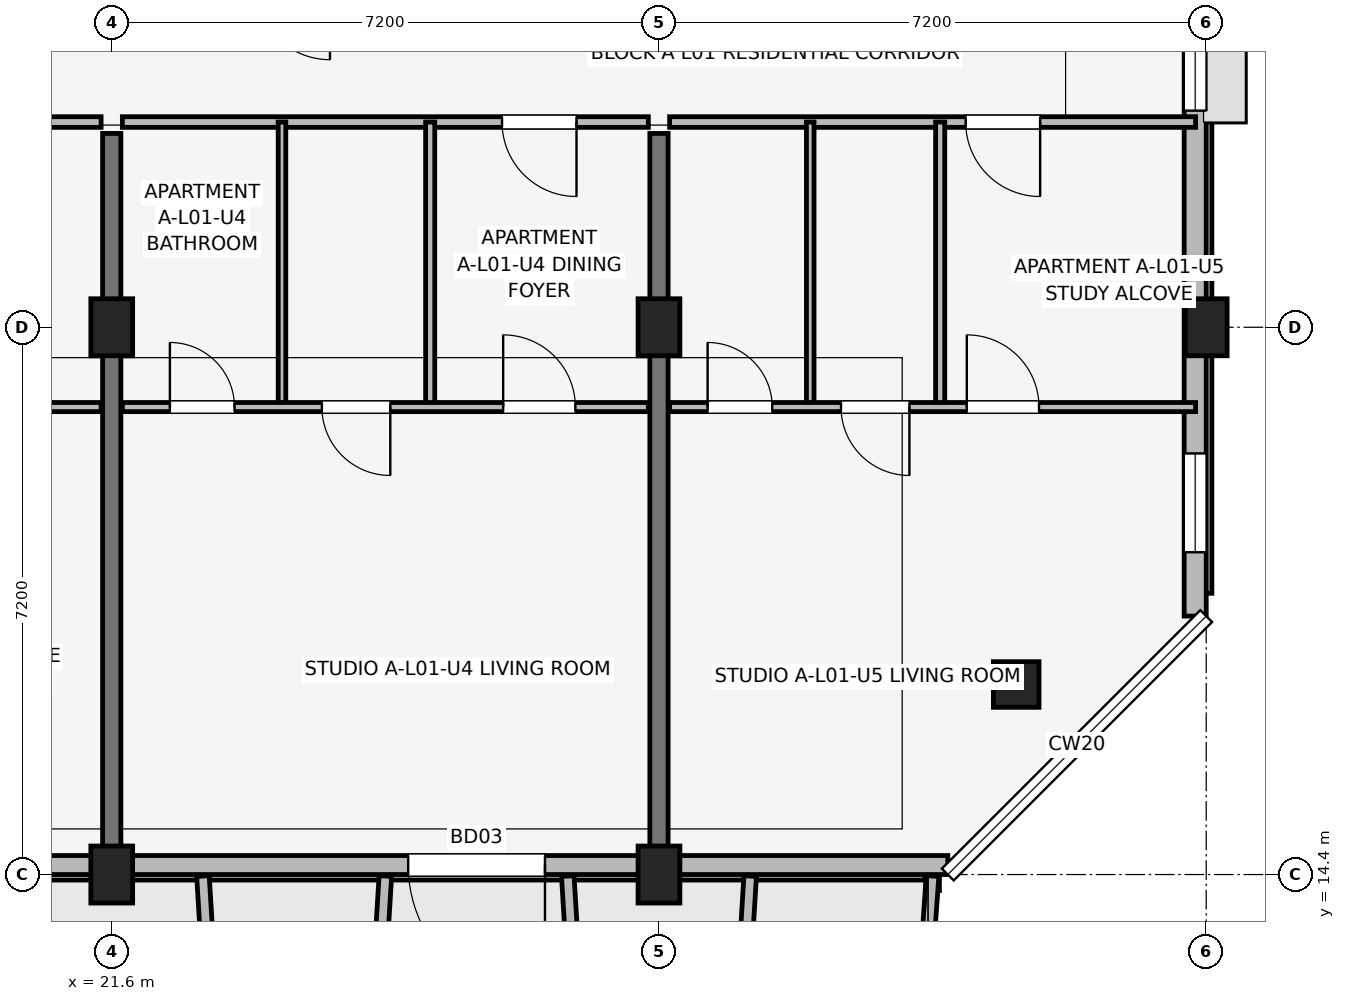
"""IFC4 building model, lengths in metres.
Left out: names, types, materials, properties, quantities, classifications, styles, units other than length and angle.
Written with IfcOpenShell. Run it as: python <this file> out.ifc"""

import sys

from ifc_helpers import new_model, si_unit, direction, frame, frame_2d, origin, origin_2d, place, context, subcontext, project, spatial, rectangle, extrude, element, fill, save


model = new_model("IFC4")
c1 = context("Model", 3, precision=1e-05, world=origin(), true_north=direction((0.0, 1.0)))
c2 = subcontext(c1, "Body", "Model", "MODEL_VIEW")
j1 = project(units=[si_unit("LENGTHUNIT", "METRE"), si_unit("PLANEANGLEUNIT", "RADIAN")], contexts=[c1])
p1 = place(None, origin())
s1 = spatial("IfcSite", under=j1, at=p1, CompositionType="ELEMENT")
p2 = place(p1, origin())
s2 = spatial("IfcBuilding", under=s1, at=p2, CompositionType="ELEMENT")
p3 = place(p2, frame((0.0, 0.0, 4.5)))
s3 = spatial("IfcBuildingStorey", under=s2, at=p3, CompositionType="ELEMENT", Elevation=4.5)
for number, where, z_axis, x_axis in (
    (1, (21.6, 14.4, 0.0), (0.0, 0.0, 1.0), (1.0, 0.0, 0.0)),
    (2, (21.6, 21.6, 0.0), (0.0, 0.0, 1.0), (1.0, 0.0, 0.0)),
    (3, (28.8, 14.4, 0.0), (0.0, 0.0, 1.0), (1.0, 0.0, 0.0)),
    (4, (28.8, 21.6, 0.0), (0.0, 0.0, 1.0), (1.0, 0.0, 0.0)),
):
    element("IfcColumn", number, at=place(p3, frame(where, z_axis=z_axis, x_axis=x_axis)), inside=s3, PredefinedType="COLUMN", context=c2, shape_type="SweptSolid", body=[
        extrude(rectangle(XDim=0.55, YDim=0.75, at=origin_2d()), origin(), (0.0, 0.0, 1.0), 4.2),
    ])
p4 = place(p3, frame((33.5, 16.9, 0.0), z_axis=(0.0, 0.0, 1.0), x_axis=(1.0, 0.0, 0.0)))
e5 = element("IfcColumn", 5, at=p4, inside=s3, PredefinedType="COLUMN", context=c2, shape_type="SweptSolid", body=[
    extrude(rectangle(XDim=0.6, YDim=0.6, at=origin_2d()), origin(), (0.0, 0.0, 1.0), 4.2),
])
p5 = place(p3, frame((36.0, 21.6, 0.0), z_axis=(0.0, 0.0, 1.0), x_axis=(1.0, 0.0, 0.0)))
e6 = element("IfcColumn", 6, at=p5, inside=s3, PredefinedType="COLUMN", context=c2, shape_type="SweptSolid", body=[
    extrude(rectangle(XDim=0.55, YDim=0.75, at=origin_2d()), origin(), (0.0, 0.0, 1.0), 4.2),
])
for number, where, z_axis, x_axis in (
    (7, (21.6, 14.75, 0.0), (0.0, 0.0, 1.0), (0.0, 1.0, 0.0)),
    (8, (28.8, 14.75, 0.0), (0.0, 0.0, 1.0), (0.0, 1.0, 0.0)),
):
    element("IfcWall", number, at=place(p3, frame(where, z_axis=z_axis, x_axis=x_axis)), inside=s3, PredefinedType="SHEAR", context=c2, shape_type="SweptSolid", body=[
        extrude(rectangle(XDim=9.4, YDim=0.24, at=frame_2d((4.7, 0.0))), origin(), (0.0, 0.0, 1.0), 4.2),
    ])
p6 = place(p3, frame((3.4, 14.525, 0.0), z_axis=(0.0, 0.0, 1.0), x_axis=(1.0, 0.0, 0.0)))
e9 = element("IfcWall", 9, at=p6, inside=s3, PredefinedType="SOLIDWALL", context=c2, shape_type="SweptSolid", body=[
    extrude(rectangle(XDim=29.2, YDim=0.25, at=frame_2d((14.6, 0.0))), origin(), (0.0, 0.0, 1.0), 3.48),
])
p7 = place(p6, frame((9.35, 0.0, 0.0), z_axis=(0.0, 0.0, 1.0), x_axis=(-1.0, 0.0, 0.0)))
e10 = element("IfcOpeningElement", 10, at=p7, cuts=e9, PredefinedType="OPENING", context=c2, shape_type="SweptSolid", body=[
    extrude(rectangle(XDim=1.5, YDim=2.15, at=frame_2d((0.75, 1.075))), frame((0.0, 0.135, 0.0), z_axis=(0.0, -1.0, 0.0), x_axis=(1.0, 0.0, 0.0)), (0.0, 0.0, 1.0), 0.27),
])
p8 = place(p6, frame((23.9, 0.0, 0.0), z_axis=(0.0, 0.0, 1.0), x_axis=(-1.0, 0.0, 0.0)))
e11 = element("IfcOpeningElement", 11, at=p8, cuts=e9, PredefinedType="OPENING", context=c2, shape_type="SweptSolid", body=[
    extrude(rectangle(XDim=1.8, YDim=2.15, at=frame_2d((0.9, 1.075))), frame((0.0, 0.135, 0.0), z_axis=(0.0, -1.0, 0.0), x_axis=(1.0, 0.0, 0.0)), (0.0, 0.0, 1.0), 0.27),
])
p9 = place(p6, frame((0.995, 0.0, 0.75)))
e12 = element("IfcOpeningElement", 12, at=p9, cuts=e9, PredefinedType="OPENING", context=c2, shape_type="SweptSolid", body=[
    extrude(rectangle(XDim=0.98, YDim=1.45, at=frame_2d((0.49, 0.725))), frame((0.0, 0.135, 0.0), z_axis=(0.0, -1.0, 0.0), x_axis=(1.0, 0.0, 0.0)), (0.0, 0.0, 1.0), 0.27),
])
p10 = place(p6, frame((12.355, 0.0, 0.75)))
e13 = element("IfcOpeningElement", 13, at=p10, cuts=e9, PredefinedType="OPENING", context=c2, shape_type="SweptSolid", body=[
    extrude(rectangle(XDim=0.72, YDim=1.35, at=frame_2d((0.36, 0.675))), frame((0.0, 0.135, 0.0), z_axis=(0.0, -1.0, 0.0), x_axis=(1.0, 0.0, 0.0)), (0.0, 0.0, 1.0), 0.27),
])
p11 = place(p6, frame((14.725, 0.0, 0.7)))
e14 = element("IfcOpeningElement", 14, at=p11, cuts=e9, PredefinedType="OPENING", context=c2, shape_type="SweptSolid", body=[
    extrude(rectangle(XDim=2.15, YDim=1.65, at=frame_2d((1.075, 0.825))), frame((0.0, 0.135, 0.0), z_axis=(0.0, -1.0, 0.0), x_axis=(1.0, 0.0, 0.0)), (0.0, 0.0, 1.0), 0.27),
])
p12 = place(p3, frame((35.855, 17.8, 0.0), z_axis=(0.0, 0.0, 1.0), x_axis=(0.0, 1.0, 0.0)))
e15 = element("IfcWall", 15, at=p12, inside=s3, PredefinedType="SOLIDWALL", context=c2, shape_type="SweptSolid", body=[
    extrude(rectangle(XDim=14.8, YDim=0.29, at=frame_2d((7.4, 0.0))), origin(), (0.0, 0.0, 1.0), 3.43),
])
p13 = place(p12, frame((6.65, 0.0, 1.05)))
e16 = element("IfcOpeningElement", 16, at=p13, cuts=e15, PredefinedType="OPENING", context=c2, shape_type="SweptSolid", body=[
    extrude(rectangle(XDim=1.5, YDim=1.15, at=frame_2d((0.75, 0.575))), frame((0.0, 0.155, 0.0), z_axis=(0.0, -1.0, 0.0), x_axis=(1.0, 0.0, 0.0)), (0.0, 0.0, 1.0), 0.31),
])
p14 = place(p12, frame((0.84, 0.0, 0.75)))
e17 = element("IfcOpeningElement", 17, at=p14, cuts=e15, PredefinedType="OPENING", context=c2, shape_type="SweptSolid", body=[
    extrude(rectangle(XDim=1.3, YDim=1.55, at=frame_2d((0.65, 0.775))), frame((0.0, 0.155, 0.0), z_axis=(0.0, -1.0, 0.0), x_axis=(1.0, 0.0, 0.0)), (0.0, 0.0, 1.0), 0.31),
])
for number, where, z_axis, x_axis in (
    (18, (22.8, 14.38, 0.0), (0.0, 0.0, 1.0), (0.061, -0.998, 0.0)),
    (19, (25.2, 14.38, 0.0), (0.0, 0.0, 1.0), (-0.061, -0.998, 0.0)),
    (20, (27.6, 14.38, 0.0), (0.0, 0.0, 1.0), (0.061, -0.998, 0.0)),
):
    element("IfcWall", number, at=place(p3, frame(where, z_axis=z_axis, x_axis=x_axis)), inside=s3, PredefinedType="ELEMENTEDWALL", context=c2, shape_type="SweptSolid", body=[
        extrude(rectangle(XDim=1.964, YDim=0.165, at=frame_2d((0.982, 0.0))), origin(), (0.0, 0.0, 1.0), 3.63),
    ])
p15 = place(p3, frame((30.0, 14.38, 0.0), z_axis=(0.0, 0.0, 1.0), x_axis=(-0.061170732449, -0.998127317276, 0.0)))
e21 = element("IfcWall", 21, at=p15, inside=s3, PredefinedType="ELEMENTEDWALL", context=c2, shape_type="SweptSolid", body=[
    extrude(rectangle(XDim=1.964, YDim=0.165, at=frame_2d((0.982, 0.0))), origin(), (0.0, 0.0, 1.0), 4.0),
])
p16 = place(p3, frame((32.4, 14.38, 0.0), z_axis=(0.0, 0.0, 1.0), x_axis=(-0.071194071069, -0.997462482625, 0.0)))
e22 = element("IfcWall", 22, at=p16, inside=s3, PredefinedType="ELEMENTEDWALL", context=c2, shape_type="SweptSolid", body=[
    extrude(rectangle(XDim=1.965, YDim=0.165, at=frame_2d((0.982, 0.0))), origin(), (0.0, 0.0, 1.0), 4.0),
])
p17 = place(p3, frame((14.54, 24.3, 0.0), z_axis=(0.0, 0.0, 1.0), x_axis=(1.0, 0.0, 0.0)))
e23 = element("IfcWall", 23, at=p17, inside=s3, PredefinedType="PARTITIONING", context=c2, shape_type="SweptSolid", body=[
    extrude(rectangle(XDim=6.92, YDim=0.14, at=frame_2d((3.46, 0.0))), origin(), (0.0, 0.0, 1.0), 3.25),
])
p18 = place(p17, frame((5.145, 0.0, 0.0)))
e24 = element("IfcOpeningElement", 24, at=p18, cuts=e23, PredefinedType="OPENING", context=c2, shape_type="SweptSolid", body=[
    extrude(rectangle(XDim=0.98, YDim=2.1, at=frame_2d((0.49, 1.05))), frame((0.0, 0.08, 0.0), z_axis=(0.0, -1.0, 0.0), x_axis=(1.0, 0.0, 0.0)), (0.0, 0.0, 1.0), 0.16),
])
p19 = place(p3, frame((14.54, 20.55, 0.0), z_axis=(0.0, 0.0, 1.0), x_axis=(1.0, 0.0, 0.0)))
e25 = element("IfcWall", 25, at=p19, inside=s3, PredefinedType="PARTITIONING", context=c2, shape_type="SweptSolid", body=[
    extrude(rectangle(XDim=6.92, YDim=0.12, at=frame_2d((3.46, 0.0))), origin(), (0.0, 0.0, 1.0), 3.25),
])
p20 = place(p19, frame((1.475, 0.0, 0.0), z_axis=(0.0, 0.0, 1.0), x_axis=(-1.0, 0.0, 0.0)))
e26 = element("IfcOpeningElement", 26, at=p20, cuts=e25, PredefinedType="OPENING", context=c2, shape_type="SweptSolid", body=[
    extrude(rectangle(XDim=0.85, YDim=2.08, at=frame_2d((0.425, 1.04))), frame((0.0, 0.07, 0.0), z_axis=(0.0, -1.0, 0.0), x_axis=(1.0, 0.0, 0.0)), (0.0, 0.0, 1.0), 0.14),
])
p21 = place(p19, frame((2.775, 0.0, 0.0)))
e27 = element("IfcOpeningElement", 27, at=p21, cuts=e25, PredefinedType="OPENING", context=c2, shape_type="SweptSolid", body=[
    extrude(rectangle(XDim=0.9, YDim=2.08, at=frame_2d((0.45, 1.04))), frame((0.0, 0.07, 0.0), z_axis=(0.0, -1.0, 0.0), x_axis=(1.0, 0.0, 0.0)), (0.0, 0.0, 1.0), 0.14),
])
p22 = place(p19, frame((6.11, 0.0, 0.0), z_axis=(0.0, 0.0, 1.0), x_axis=(-1.0, 0.0, 0.0)))
e28 = element("IfcOpeningElement", 28, at=p22, cuts=e25, PredefinedType="OPENING", context=c2, shape_type="SweptSolid", body=[
    extrude(rectangle(XDim=0.95, YDim=2.08, at=frame_2d((0.475, 1.04))), frame((0.0, 0.07, 0.0), z_axis=(0.0, -1.0, 0.0), x_axis=(1.0, 0.0, 0.0)), (0.0, 0.0, 1.0), 0.14),
])
p23 = place(p3, frame((21.74, 24.3, 0.0), z_axis=(0.0, 0.0, 1.0), x_axis=(1.0, 0.0, 0.0)))
e29 = element("IfcWall", 29, at=p23, inside=s3, PredefinedType="PARTITIONING", context=c2, shape_type="SweptSolid", body=[
    extrude(rectangle(XDim=6.92, YDim=0.14, at=frame_2d((3.46, 0.0))), origin(), (0.0, 0.0, 1.0), 3.25),
])
p24 = place(p23, frame((5.975, 0.0, 0.0), z_axis=(0.0, 0.0, 1.0), x_axis=(-1.0, 0.0, 0.0)))
e30 = element("IfcOpeningElement", 30, at=p24, cuts=e29, PredefinedType="OPENING", context=c2, shape_type="SweptSolid", body=[
    extrude(rectangle(XDim=0.98, YDim=2.1, at=frame_2d((0.49, 1.05))), frame((0.0, 0.08, 0.0), z_axis=(0.0, -1.0, 0.0), x_axis=(1.0, 0.0, 0.0)), (0.0, 0.0, 1.0), 0.16),
])
p25 = place(p3, frame((23.84, 20.55, 0.0), z_axis=(0.0, 0.0, 1.0), x_axis=(0.0, 1.0, 0.0)))
e31 = element("IfcWall", 31, at=p25, inside=s3, PredefinedType="PARTITIONING", context=c2, shape_type="SweptSolid", body=[
    extrude(rectangle(XDim=3.75, YDim=0.1, at=frame_2d((1.875, 0.0))), origin(), (0.0, 0.0, 1.0), 3.25),
])
p26 = place(p3, frame((25.79, 20.55, 0.0), z_axis=(0.0, 0.0, 1.0), x_axis=(0.0, 1.0, 0.0)))
e32 = element("IfcWall", 32, at=p26, inside=s3, PredefinedType="PARTITIONING", context=c2, shape_type="SweptSolid", body=[
    extrude(rectangle(XDim=3.75, YDim=0.12, at=frame_2d((1.875, 0.0))), origin(), (0.0, 0.0, 1.0), 3.25),
])
p27 = place(p3, frame((21.74, 20.55, 0.0), z_axis=(0.0, 0.0, 1.0), x_axis=(1.0, 0.0, 0.0)))
e33 = element("IfcWall", 33, at=p27, inside=s3, PredefinedType="PARTITIONING", context=c2, shape_type="SweptSolid", body=[
    extrude(rectangle(XDim=6.92, YDim=0.12, at=frame_2d((3.46, 0.0))), origin(), (0.0, 0.0, 1.0), 3.25),
])
p28 = place(p27, frame((0.625, 0.0, 0.0)))
e34 = element("IfcOpeningElement", 34, at=p28, cuts=e33, PredefinedType="OPENING", context=c2, shape_type="SweptSolid", body=[
    extrude(rectangle(XDim=0.85, YDim=2.08, at=frame_2d((0.425, 1.04))), frame((0.0, 0.07, 0.0), z_axis=(0.0, -1.0, 0.0), x_axis=(1.0, 0.0, 0.0)), (0.0, 0.0, 1.0), 0.14),
])
p29 = place(p27, frame((3.525, 0.0, 0.0), z_axis=(0.0, 0.0, 1.0), x_axis=(-1.0, 0.0, 0.0)))
e35 = element("IfcOpeningElement", 35, at=p29, cuts=e33, PredefinedType="OPENING", context=c2, shape_type="SweptSolid", body=[
    extrude(rectangle(XDim=0.9, YDim=2.08, at=frame_2d((0.45, 1.04))), frame((0.0, 0.07, 0.0), z_axis=(0.0, -1.0, 0.0), x_axis=(1.0, 0.0, 0.0)), (0.0, 0.0, 1.0), 0.14),
])
p30 = place(p27, frame((5.01, 0.0, 0.0)))
e36 = element("IfcOpeningElement", 36, at=p30, cuts=e33, PredefinedType="OPENING", context=c2, shape_type="SweptSolid", body=[
    extrude(rectangle(XDim=0.95, YDim=2.08, at=frame_2d((0.475, 1.04))), frame((0.0, 0.07, 0.0), z_axis=(0.0, -1.0, 0.0), x_axis=(1.0, 0.0, 0.0)), (0.0, 0.0, 1.0), 0.14),
])
p31 = place(p3, frame((28.94, 24.3, 0.0), z_axis=(0.0, 0.0, 1.0), x_axis=(1.0, 0.0, 0.0)))
e37 = element("IfcWall", 37, at=p31, inside=s3, PredefinedType="PARTITIONING", context=c2, shape_type="SweptSolid", body=[
    extrude(rectangle(XDim=6.92, YDim=0.14, at=frame_2d((3.46, 0.0))), origin(), (0.0, 0.0, 1.0), 3.25),
])
p32 = place(p31, frame((4.875, 0.0, 0.0), z_axis=(0.0, 0.0, 1.0), x_axis=(-1.0, 0.0, 0.0)))
e38 = element("IfcOpeningElement", 38, at=p32, cuts=e37, PredefinedType="OPENING", context=c2, shape_type="SweptSolid", body=[
    extrude(rectangle(XDim=0.98, YDim=2.1, at=frame_2d((0.49, 1.05))), frame((0.0, 0.08, 0.0), z_axis=(0.0, -1.0, 0.0), x_axis=(1.0, 0.0, 0.0)), (0.0, 0.0, 1.0), 0.16),
])
p33 = place(p3, frame((30.79, 20.55, 0.0), z_axis=(0.0, 0.0, 1.0), x_axis=(0.0, 1.0, 0.0)))
e39 = element("IfcWall", 39, at=p33, inside=s3, PredefinedType="PARTITIONING", context=c2, shape_type="SweptSolid", body=[
    extrude(rectangle(XDim=3.75, YDim=0.1, at=frame_2d((1.875, 0.0))), origin(), (0.0, 0.0, 1.0), 3.25),
])
p34 = place(p3, frame((32.5, 20.55, 0.0), z_axis=(0.0, 0.0, 1.0), x_axis=(0.0, 1.0, 0.0)))
e40 = element("IfcWall", 40, at=p34, inside=s3, PredefinedType="PARTITIONING", context=c2, shape_type="SweptSolid", body=[
    extrude(rectangle(XDim=3.75, YDim=0.12, at=frame_2d((1.875, 0.0))), origin(), (0.0, 0.0, 1.0), 3.25),
])
p35 = place(p3, frame((28.94, 20.55, 0.0), z_axis=(0.0, 0.0, 1.0), x_axis=(1.0, 0.0, 0.0)))
e41 = element("IfcWall", 41, at=p35, inside=s3, PredefinedType="PARTITIONING", context=c2, shape_type="SweptSolid", body=[
    extrude(rectangle(XDim=6.92, YDim=0.12, at=frame_2d((3.46, 0.0))), origin(), (0.0, 0.0, 1.0), 3.25),
])
p36 = place(p35, frame((0.5, 0.0, 0.0)))
e42 = element("IfcOpeningElement", 42, at=p36, cuts=e41, PredefinedType="OPENING", context=c2, shape_type="SweptSolid", body=[
    extrude(rectangle(XDim=0.85, YDim=2.08, at=frame_2d((0.425, 1.04))), frame((0.0, 0.07, 0.0), z_axis=(0.0, -1.0, 0.0), x_axis=(1.0, 0.0, 0.0)), (0.0, 0.0, 1.0), 0.14),
])
p37 = place(p35, frame((3.155, 0.0, 0.0), z_axis=(0.0, 0.0, 1.0), x_axis=(-1.0, 0.0, 0.0)))
e43 = element("IfcOpeningElement", 43, at=p37, cuts=e41, PredefinedType="OPENING", context=c2, shape_type="SweptSolid", body=[
    extrude(rectangle(XDim=0.9, YDim=2.08, at=frame_2d((0.45, 1.04))), frame((0.0, 0.07, 0.0), z_axis=(0.0, -1.0, 0.0), x_axis=(1.0, 0.0, 0.0)), (0.0, 0.0, 1.0), 0.14),
])
p38 = place(p35, frame((3.91, 0.0, 0.0)))
e44 = element("IfcOpeningElement", 44, at=p38, cuts=e41, PredefinedType="OPENING", context=c2, shape_type="SweptSolid", body=[
    extrude(rectangle(XDim=0.95, YDim=2.08, at=frame_2d((0.475, 1.04))), frame((0.0, 0.07, 0.0), z_axis=(0.0, -1.0, 0.0), x_axis=(1.0, 0.0, 0.0)), (0.0, 0.0, 1.0), 0.14),
])
p39 = place(p8, origin())
e45 = element("IfcDoor", 45, at=p39, inside=s3, OperationType="SINGLE_SWING_RIGHT", PredefinedType="DOOR", context=c2, shape_type="SweptSolid", body=[
    extrude(rectangle(XDim=1.8, YDim=2.15, at=frame_2d((0.9, 1.075))), frame((0.0, 0.025, 0.0), z_axis=(0.0, -1.0, 0.0), x_axis=(1.0, 0.0, 0.0)), (0.0, 0.0, 1.0), 0.05),
])
fill(e11, e45)
p40 = place(p13, origin())
e46 = element("IfcWindow", 46, at=p40, inside=s3, PartitioningType="SINGLE_PANEL", PredefinedType="WINDOW", context=c2, shape_type="SweptSolid", body=[
    extrude(rectangle(XDim=1.5, YDim=1.15, at=frame_2d((0.75, 0.575))), frame((0.0, 0.03, 0.0), z_axis=(0.0, -1.0, 0.0), x_axis=(1.0, 0.0, 0.0)), (0.0, 0.0, 1.0), 0.06),
])
fill(e16, e46)
p41 = place(p14, origin())
e47 = element("IfcWindow", 47, at=p41, inside=s3, PartitioningType="SINGLE_PANEL", PredefinedType="WINDOW", context=c2, shape_type="SweptSolid", body=[
    extrude(rectangle(XDim=1.3, YDim=1.55, at=frame_2d((0.65, 0.775))), frame((0.0, 0.03, 0.0), z_axis=(0.0, -1.0, 0.0), x_axis=(1.0, 0.0, 0.0)), (0.0, 0.0, 1.0), 0.06),
])
fill(e17, e47)
p42 = place(p24, origin())
e48 = element("IfcDoor", 48, at=p42, inside=s3, OperationType="SINGLE_SWING_RIGHT", PredefinedType="DOOR", context=c2, shape_type="SweptSolid", body=[
    extrude(rectangle(XDim=0.98, YDim=2.1, at=frame_2d((0.49, 1.05))), frame((0.0, 0.025, 0.0), z_axis=(0.0, -1.0, 0.0), x_axis=(1.0, 0.0, 0.0)), (0.0, 0.0, 1.0), 0.05),
])
fill(e30, e48)
p43 = place(p28, origin())
e49 = element("IfcDoor", 49, at=p43, inside=s3, OperationType="SINGLE_SWING_LEFT", PredefinedType="DOOR", context=c2, shape_type="SweptSolid", body=[
    extrude(rectangle(XDim=0.85, YDim=2.08, at=frame_2d((0.425, 1.04))), frame((0.0, 0.025, 0.0), z_axis=(0.0, -1.0, 0.0), x_axis=(1.0, 0.0, 0.0)), (0.0, 0.0, 1.0), 0.05),
])
fill(e34, e49)
p44 = place(p29, origin())
e50 = element("IfcDoor", 50, at=p44, inside=s3, OperationType="SINGLE_SWING_RIGHT", PredefinedType="DOOR", context=c2, shape_type="SweptSolid", body=[
    extrude(rectangle(XDim=0.9, YDim=2.08, at=frame_2d((0.45, 1.04))), frame((0.0, 0.025, 0.0), z_axis=(0.0, -1.0, 0.0), x_axis=(1.0, 0.0, 0.0)), (0.0, 0.0, 1.0), 0.05),
])
fill(e35, e50)
p45 = place(p30, origin())
e51 = element("IfcDoor", 51, at=p45, inside=s3, OperationType="SINGLE_SWING_LEFT", PredefinedType="DOOR", context=c2, shape_type="SweptSolid", body=[
    extrude(rectangle(XDim=0.95, YDim=2.08, at=frame_2d((0.475, 1.04))), frame((0.0, 0.025, 0.0), z_axis=(0.0, -1.0, 0.0), x_axis=(1.0, 0.0, 0.0)), (0.0, 0.0, 1.0), 0.05),
])
fill(e36, e51)
p46 = place(p32, origin())
e52 = element("IfcDoor", 52, at=p46, inside=s3, OperationType="SINGLE_SWING_RIGHT", PredefinedType="DOOR", context=c2, shape_type="SweptSolid", body=[
    extrude(rectangle(XDim=0.98, YDim=2.1, at=frame_2d((0.49, 1.05))), frame((0.0, 0.025, 0.0), z_axis=(0.0, -1.0, 0.0), x_axis=(1.0, 0.0, 0.0)), (0.0, 0.0, 1.0), 0.05),
])
fill(e38, e52)
p47 = place(p36, origin())
e53 = element("IfcDoor", 53, at=p47, inside=s3, OperationType="SINGLE_SWING_LEFT", PredefinedType="DOOR", context=c2, shape_type="SweptSolid", body=[
    extrude(rectangle(XDim=0.85, YDim=2.08, at=frame_2d((0.425, 1.04))), frame((0.0, 0.025, 0.0), z_axis=(0.0, -1.0, 0.0), x_axis=(1.0, 0.0, 0.0)), (0.0, 0.0, 1.0), 0.05),
])
fill(e42, e53)
p48 = place(p37, origin())
e54 = element("IfcDoor", 54, at=p48, inside=s3, OperationType="SINGLE_SWING_RIGHT", PredefinedType="DOOR", context=c2, shape_type="SweptSolid", body=[
    extrude(rectangle(XDim=0.9, YDim=2.08, at=frame_2d((0.45, 1.04))), frame((0.0, 0.025, 0.0), z_axis=(0.0, -1.0, 0.0), x_axis=(1.0, 0.0, 0.0)), (0.0, 0.0, 1.0), 0.05),
])
fill(e43, e54)
p49 = place(p38, origin())
e55 = element("IfcDoor", 55, at=p49, inside=s3, OperationType="SINGLE_SWING_LEFT", PredefinedType="DOOR", context=c2, shape_type="SweptSolid", body=[
    extrude(rectangle(XDim=0.95, YDim=2.08, at=frame_2d((0.475, 1.04))), frame((0.0, 0.025, 0.0), z_axis=(0.0, -1.0, 0.0), x_axis=(1.0, 0.0, 0.0)), (0.0, 0.0, 1.0), 0.05),
])
fill(e44, e55)
save(model, sys.argv[1])
